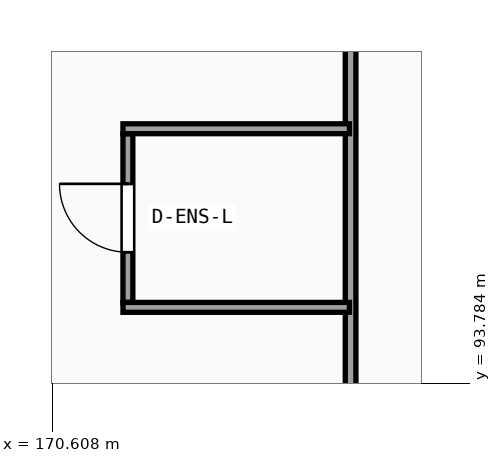
"""IFC4 building model, lengths in metres.
Left out: names, types, materials, properties, quantities, classifications, styles, units other than length and angle.
Written with IfcOpenShell. Run it as: python <this file> out.ifc"""

import sys

from ifc_helpers import new_model, si_unit, direction, frame, frame_2d, origin, place, context, subcontext, project, spatial, rectangle, extrude, element, fill, save


model = new_model("IFC4")
c1 = context("Model", 3, precision=1e-05, world=origin(), true_north=direction((0.0, 1.0)))
c2 = subcontext(c1, "Body", "Model", "MODEL_VIEW")
j1 = project(units=[si_unit("LENGTHUNIT", "METRE"), si_unit("PLANEANGLEUNIT", "RADIAN")], contexts=[c1])
p1 = place(None, origin())
s1 = spatial("IfcSite", under=j1, at=p1, CompositionType="ELEMENT")
p2 = place(p1, origin())
s2 = spatial("IfcBuilding", under=s1, at=p2, CompositionType="ELEMENT")
p3 = place(p2, frame((0.0, 0.0, 22.95)))
s3 = spatial("IfcBuildingStorey", under=s2, at=p3, CompositionType="ELEMENT", Elevation=22.95)
p4 = place(p3, frame((174.533, 82.49, 0.0), z_axis=(0.0, 0.0, 1.0), x_axis=(0.0, 1.0, 0.0)))
e1 = element("IfcWall", 1, at=p4, inside=s3, PredefinedType="PARTITIONING", context=c2, shape_type="SweptSolid", body=[
    extrude(rectangle(XDim=17.225, YDim=0.14, at=frame_2d((8.613, 0.0))), origin(), (0.0, 0.0, 1.0), 3.25),
])
p5 = place(p3, frame((171.603, 94.85, 0.0), z_axis=(0.0, 0.0, 1.0), x_axis=(0.0, 1.0, 0.0)))
e2 = element("IfcWall", 2, at=p5, inside=s3, PredefinedType="PARTITIONING", context=c2, shape_type="SweptSolid", body=[
    extrude(rectangle(XDim=2.22, YDim=0.13, at=frame_2d((1.11, 0.0))), origin(), (0.0, 0.0, 1.0), 3.77),
])
p6 = place(p5, frame((0.66, 0.0, 0.0)))
e3 = element("IfcOpeningElement", 3, at=p6, cuts=e2, PredefinedType="OPENING", context=c2, shape_type="SweptSolid", body=[
    extrude(rectangle(XDim=0.9, YDim=2.1, at=frame_2d((0.45, 1.05))), frame((0.0, 0.075, 0.0), z_axis=(0.0, -1.0, 0.0), x_axis=(1.0, 0.0, 0.0)), (0.0, 0.0, 1.0), 0.15),
])
for number, where, z_axis, x_axis in (
    (4, (171.538, 94.785, 0.0), (0.0, 0.0, 1.0), (1.0, 0.0, 0.0)),
    (5, (171.538, 97.135, 0.0), (0.0, 0.0, 1.0), (1.0, 0.0, 0.0)),
):
    element("IfcWall", number, at=place(p3, frame(where, z_axis=z_axis, x_axis=x_axis)), inside=s3, PredefinedType="PARTITIONING", context=c2, shape_type="SweptSolid", body=[
        extrude(rectangle(XDim=2.98, YDim=0.13, at=frame_2d((1.49, 0.0))), origin(), (0.0, 0.0, 1.0), 3.77),
    ])
p7 = place(p6, origin())
e6 = element("IfcDoor", 6, at=p7, inside=s3, OperationType="SINGLE_SWING_RIGHT", PredefinedType="DOOR", context=c2, shape_type="SweptSolid", body=[
    extrude(rectangle(XDim=0.9, YDim=2.1, at=frame_2d((0.45, 1.05))), frame((0.0, 0.025, 0.0), z_axis=(0.0, -1.0, 0.0), x_axis=(1.0, 0.0, 0.0)), (0.0, 0.0, 1.0), 0.05),
])
fill(e3, e6)
save(model, sys.argv[1])
